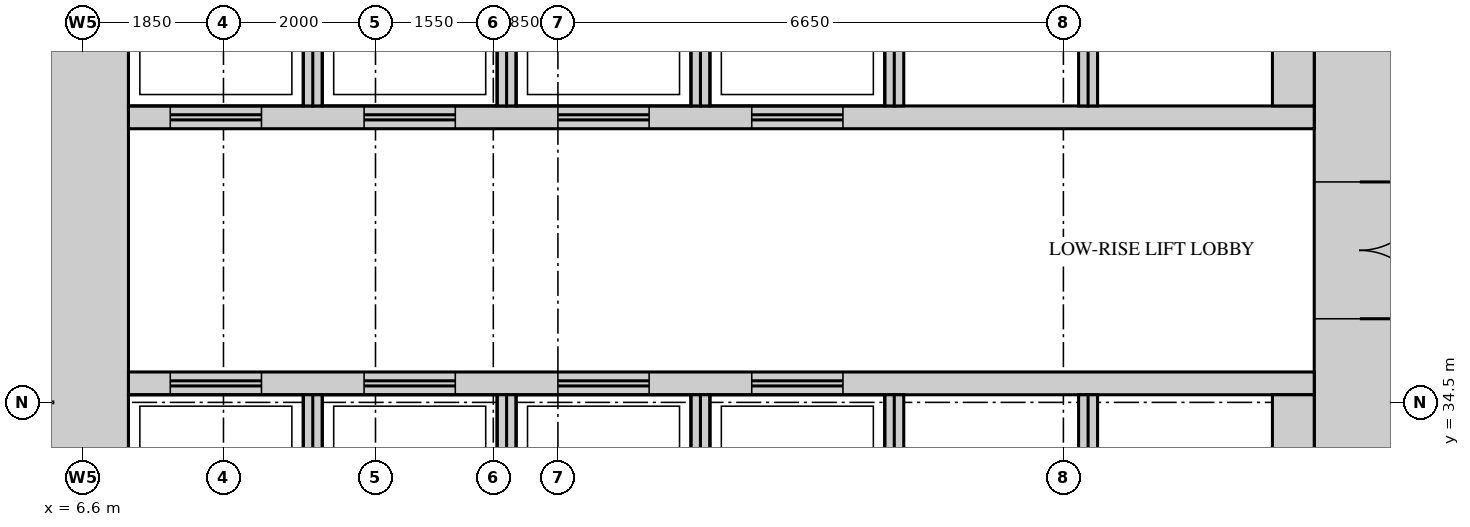
"""IFC4 building model, lengths in metres.
Left out: names, types, materials, properties, quantities, classifications, styles, units other than length and angle.
Written with IfcOpenShell. Run it as: python <this file> out.ifc"""

import sys

from ifc_helpers import new_model, si_unit, direction, frame, frame_2d, origin, place, context, subcontext, project, spatial, rectangle, extrude, source, transform, mapped, element, fill, save


model = new_model("IFC4")
c1 = context("Model", 3, precision=1e-05, world=origin(), true_north=direction((0.0, 1.0)))
c2 = subcontext(c1, "Body", "Model", "MODEL_VIEW")
j1 = project(units=[si_unit("LENGTHUNIT", "METRE"), si_unit("PLANEANGLEUNIT", "RADIAN")], contexts=[c1])
p1 = place(None, origin())
s1 = spatial("IfcSite", under=j1, at=p1, CompositionType="ELEMENT")
p2 = place(p1, origin())
s2 = spatial("IfcBuilding", under=s1, at=p2, CompositionType="ELEMENT")
p3 = place(p2, frame((0.0, 0.0, 96.0)))
s3 = spatial("IfcBuildingStorey", under=s2, at=p3, CompositionType="ELEMENT", Elevation=96.0)
m1 = source(origin(), c2, "Body", "SweptSolid", [
    extrude(rectangle(XDim=27.6, YDim=1.2, at=frame_2d((13.8, 0.0))), origin(), (0.0, 0.0, 1.0), 5.2),
])
p4 = place(p3, frame((23.4, 13.2, 0.0), z_axis=(0.0, 0.0, 1.0), x_axis=(0.0, 1.0, 0.0)))
e1 = element("IfcWall", 1, at=p4, inside=s3, PredefinedType="SHEAR", context=c2, shape_type="MappedRepresentation", body=[
    mapped(m1, transform((0.0, 0.0, 0.0))),
])
m2 = source(origin(), c2, "Body", "SweptSolid", [
    extrude(rectangle(XDim=1.8, YDim=2.1, at=frame_2d((0.9, 1.05))), frame((0.0, 0.61, 0.0), z_axis=(0.0, -1.0, 0.0), x_axis=(1.0, 0.0, 0.0)), (0.0, 0.0, 1.0), 1.22),
])
p5 = place(p4, frame((22.4, 0.0, 0.0)))
e2 = element("IfcOpeningElement", 2, at=p5, cuts=e1, PredefinedType="OPENING", context=c2, shape_type="MappedRepresentation", body=[
    mapped(m2, transform((0.0, 0.0, 0.0))),
])
m3 = source(origin(), c2, "Body", "SweptSolid", [
    extrude(rectangle(XDim=1.2, YDim=2.1, at=frame_2d((0.6, 1.05))), frame((0.0, 0.61, 0.0), z_axis=(0.0, -1.0, 0.0), x_axis=(1.0, 0.0, 0.0)), (0.0, 0.0, 1.0), 1.22),
])
p6 = place(p4, frame((12.15, 0.0, 0.0)))
e3 = element("IfcOpeningElement", 3, at=p6, cuts=e1, PredefinedType="OPENING", context=c2, shape_type="MappedRepresentation", body=[
    mapped(m3, transform((0.0, 0.0, 0.0))),
])
m4 = source(origin(), c2, "Body", "SweptSolid", [
    extrude(rectangle(XDim=0.9, YDim=2.1, at=frame_2d((0.45, 1.05))), frame((0.0, 0.61, 0.0), z_axis=(0.0, -1.0, 0.0), x_axis=(1.0, 0.0, 0.0)), (0.0, 0.0, 1.0), 1.22),
])
p7 = place(p4, frame((1.95, 0.0, 0.0)))
e4 = element("IfcOpeningElement", 4, at=p7, cuts=e1, PredefinedType="OPENING", context=c2, shape_type="MappedRepresentation", body=[
    mapped(m4, transform((0.0, 0.0, 0.0))),
])
p8 = place(p4, frame((6.8, 0.0, 0.0)))
e5 = element("IfcOpeningElement", 5, at=p8, cuts=e1, PredefinedType="OPENING", context=c2, shape_type="MappedRepresentation", body=[
    mapped(m4, transform((0.0, 0.0, 0.0))),
])
p9 = place(p3, frame((6.6, 13.2, 0.0), z_axis=(0.0, 0.0, 1.0), x_axis=(0.0, 1.0, 0.0)))
e6 = element("IfcWall", 6, at=p9, inside=s3, PredefinedType="SHEAR", context=c2, shape_type="MappedRepresentation", body=[
    mapped(m1, transform((0.0, 0.0, 0.0))),
])
m5 = source(origin(), c2, "Body", "SweptSolid", [
    extrude(rectangle(XDim=15.6, YDim=0.3, at=frame_2d((7.8, 0.0))), origin(), (0.0, 0.0, 1.0), 5.2),
])
p10 = place(p3, frame((7.2, 38.25, 0.0), z_axis=(0.0, 0.0, 1.0), x_axis=(1.0, 0.0, 0.0)))
e7 = element("IfcWall", 7, at=p10, inside=s3, PredefinedType="STANDARD", context=c2, shape_type="MappedRepresentation", body=[
    mapped(m5, transform((0.0, 0.0, 0.0))),
])
m6 = source(origin(), c2, "Body", "SweptSolid", [
    extrude(rectangle(XDim=1.2, YDim=2.1, at=frame_2d((0.6, 1.05))), frame((0.0, 0.16, 0.0), z_axis=(0.0, -1.0, 0.0), x_axis=(1.0, 0.0, 0.0)), (0.0, 0.0, 1.0), 0.32),
])
p11 = place(p10, frame((0.55, 0.0, 0.0)))
e8 = element("IfcOpeningElement", 8, at=p11, cuts=e7, PredefinedType="OPENING", context=c2, shape_type="MappedRepresentation", body=[
    mapped(m6, transform((0.0, 0.0, 0.0))),
])
p12 = place(p10, frame((3.1, 0.0, 0.0)))
e9 = element("IfcOpeningElement", 9, at=p12, cuts=e7, PredefinedType="OPENING", context=c2, shape_type="MappedRepresentation", body=[
    mapped(m6, transform((0.0, 0.0, 0.0))),
])
p13 = place(p10, frame((5.65, 0.0, 0.0)))
e10 = element("IfcOpeningElement", 10, at=p13, cuts=e7, PredefinedType="OPENING", context=c2, shape_type="MappedRepresentation", body=[
    mapped(m6, transform((0.0, 0.0, 0.0))),
])
p14 = place(p10, frame((8.2, 0.0, 0.0)))
e11 = element("IfcOpeningElement", 11, at=p14, cuts=e7, PredefinedType="OPENING", context=c2, shape_type="MappedRepresentation", body=[
    mapped(m6, transform((0.0, 0.0, 0.0))),
])
p15 = place(p3, frame((7.2, 34.75, 0.0), z_axis=(0.0, 0.0, 1.0), x_axis=(1.0, 0.0, 0.0)))
e12 = element("IfcWall", 12, at=p15, inside=s3, PredefinedType="STANDARD", context=c2, shape_type="MappedRepresentation", body=[
    mapped(m5, transform((0.0, 0.0, 0.0))),
])
p16 = place(p15, frame((0.55, 0.0, 0.0)))
e13 = element("IfcOpeningElement", 13, at=p16, cuts=e12, PredefinedType="OPENING", context=c2, shape_type="MappedRepresentation", body=[
    mapped(m6, transform((0.0, 0.0, 0.0))),
])
p17 = place(p15, frame((3.1, 0.0, 0.0)))
e14 = element("IfcOpeningElement", 14, at=p17, cuts=e12, PredefinedType="OPENING", context=c2, shape_type="MappedRepresentation", body=[
    mapped(m6, transform((0.0, 0.0, 0.0))),
])
p18 = place(p15, frame((5.65, 0.0, 0.0)))
e15 = element("IfcOpeningElement", 15, at=p18, cuts=e12, PredefinedType="OPENING", context=c2, shape_type="MappedRepresentation", body=[
    mapped(m6, transform((0.0, 0.0, 0.0))),
])
p19 = place(p15, frame((8.2, 0.0, 0.0)))
e16 = element("IfcOpeningElement", 16, at=p19, cuts=e12, PredefinedType="OPENING", context=c2, shape_type="MappedRepresentation", body=[
    mapped(m6, transform((0.0, 0.0, 0.0))),
])
m7 = source(origin(), c2, "Body", "SweptSolid", [
    extrude(rectangle(XDim=2.4, YDim=0.25, at=frame_2d((1.2, 0.0))), origin(), (0.0, 0.0, 1.0), 5.2),
])
for number, where, z_axis, x_axis in (
    (17, (9.625, 38.4, 0.0), (0.0, 0.0, 1.0), (0.0, 1.0, 0.0)),
    (18, (12.175, 38.4, 0.0), (0.0, 0.0, 1.0), (0.0, 1.0, 0.0)),
    (19, (14.725, 38.4, 0.0), (0.0, 0.0, 1.0), (0.0, 1.0, 0.0)),
    (20, (17.275, 38.4, 0.0), (0.0, 0.0, 1.0), (0.0, 1.0, 0.0)),
    (21, (19.825, 38.4, 0.0), (0.0, 0.0, 1.0), (0.0, 1.0, 0.0)),
):
    element("IfcWall", number, at=place(p3, frame(where, z_axis=z_axis, x_axis=x_axis)), inside=s3, PredefinedType="STANDARD", context=c2, shape_type="MappedRepresentation", body=[
        mapped(m7, transform((0.0, 0.0, 0.0))),
    ])
m8 = source(origin(), c2, "Body", "SweptSolid", [
    extrude(rectangle(XDim=2.4, YDim=0.55, at=frame_2d((1.2, 0.0))), origin(), (0.0, 0.0, 1.0), 5.2),
])
p20 = place(p3, frame((22.525, 38.4, 0.0), z_axis=(0.0, 0.0, 1.0), x_axis=(0.0, 1.0, 0.0)))
e22 = element("IfcWall", 22, at=p20, inside=s3, PredefinedType="STANDARD", context=c2, shape_type="MappedRepresentation", body=[
    mapped(m8, transform((0.0, 0.0, 0.0))),
])
for number, where, z_axis, x_axis in (
    (23, (9.625, 32.2, 0.0), (0.0, 0.0, 1.0), (0.0, 1.0, 0.0)),
    (24, (12.175, 32.2, 0.0), (0.0, 0.0, 1.0), (0.0, 1.0, 0.0)),
    (25, (14.725, 32.2, 0.0), (0.0, 0.0, 1.0), (0.0, 1.0, 0.0)),
    (26, (17.275, 32.2, 0.0), (0.0, 0.0, 1.0), (0.0, 1.0, 0.0)),
    (27, (19.825, 32.2, 0.0), (0.0, 0.0, 1.0), (0.0, 1.0, 0.0)),
):
    element("IfcWall", number, at=place(p3, frame(where, z_axis=z_axis, x_axis=x_axis)), inside=s3, PredefinedType="STANDARD", context=c2, shape_type="MappedRepresentation", body=[
        mapped(m7, transform((0.0, 0.0, 0.0))),
    ])
p21 = place(p3, frame((22.525, 32.2, 0.0), z_axis=(0.0, 0.0, 1.0), x_axis=(0.0, 1.0, 0.0)))
e28 = element("IfcWall", 28, at=p21, inside=s3, PredefinedType="STANDARD", context=c2, shape_type="MappedRepresentation", body=[
    mapped(m8, transform((0.0, 0.0, 0.0))),
])
m9 = source(origin(), c2, "Body", "SweptSolid", [
    extrude(rectangle(XDim=1.8, YDim=2.1, at=frame_2d((0.9, 1.05))), frame((0.0, 0.55, 0.0), z_axis=(0.0, -1.0, 0.0), x_axis=(1.0, 0.0, 0.0)), (0.0, 0.0, 1.0), 1.1),
])
p22 = place(p5, origin())
e29 = element("IfcDoor", 29, at=p22, inside=s3, OperationType="DOUBLE_DOOR_SINGLE_SWING", PredefinedType="DOOR", context=c2, shape_type="MappedRepresentation", body=[
    mapped(m9, transform((0.0, 0.0, 0.0))),
])
fill(e2, e29)
m10 = source(origin(), c2, "Body", "SweptSolid", [
    extrude(rectangle(XDim=1.2, YDim=2.1, at=frame_2d((0.6, 1.05))), frame((0.0, 0.025, 0.0), z_axis=(0.0, -1.0, 0.0), x_axis=(1.0, 0.0, 0.0)), (0.0, 0.0, 1.0), 0.05),
])
p23 = place(p16, origin())
e30 = element("IfcDoor", 30, at=p23, inside=s3, OperationType="DOUBLE_DOOR_SLIDING", PredefinedType="DOOR", context=c2, shape_type="MappedRepresentation", body=[
    mapped(m10, transform((0.0, 0.0, 0.0))),
])
fill(e13, e30)
p24 = place(p17, origin())
e31 = element("IfcDoor", 31, at=p24, inside=s3, OperationType="DOUBLE_DOOR_SLIDING", PredefinedType="DOOR", context=c2, shape_type="MappedRepresentation", body=[
    mapped(m10, transform((0.0, 0.0, 0.0))),
])
fill(e14, e31)
p25 = place(p18, origin())
e32 = element("IfcDoor", 32, at=p25, inside=s3, OperationType="DOUBLE_DOOR_SLIDING", PredefinedType="DOOR", context=c2, shape_type="MappedRepresentation", body=[
    mapped(m10, transform((0.0, 0.0, 0.0))),
])
fill(e15, e32)
p26 = place(p19, origin())
e33 = element("IfcDoor", 33, at=p26, inside=s3, OperationType="DOUBLE_DOOR_SLIDING", PredefinedType="DOOR", context=c2, shape_type="MappedRepresentation", body=[
    mapped(m10, transform((0.0, 0.0, 0.0))),
])
fill(e16, e33)
p27 = place(p11, origin())
e34 = element("IfcDoor", 34, at=p27, inside=s3, OperationType="DOUBLE_DOOR_SLIDING", PredefinedType="DOOR", context=c2, shape_type="MappedRepresentation", body=[
    mapped(m10, transform((0.0, 0.0, 0.0))),
])
fill(e8, e34)
p28 = place(p12, origin())
e35 = element("IfcDoor", 35, at=p28, inside=s3, OperationType="DOUBLE_DOOR_SLIDING", PredefinedType="DOOR", context=c2, shape_type="MappedRepresentation", body=[
    mapped(m10, transform((0.0, 0.0, 0.0))),
])
fill(e9, e35)
p29 = place(p13, origin())
e36 = element("IfcDoor", 36, at=p29, inside=s3, OperationType="DOUBLE_DOOR_SLIDING", PredefinedType="DOOR", context=c2, shape_type="MappedRepresentation", body=[
    mapped(m10, transform((0.0, 0.0, 0.0))),
])
fill(e10, e36)
p30 = place(p14, origin())
e37 = element("IfcDoor", 37, at=p30, inside=s3, OperationType="DOUBLE_DOOR_SLIDING", PredefinedType="DOOR", context=c2, shape_type="MappedRepresentation", body=[
    mapped(m10, transform((0.0, 0.0, 0.0))),
])
fill(e11, e37)
save(model, sys.argv[1])
